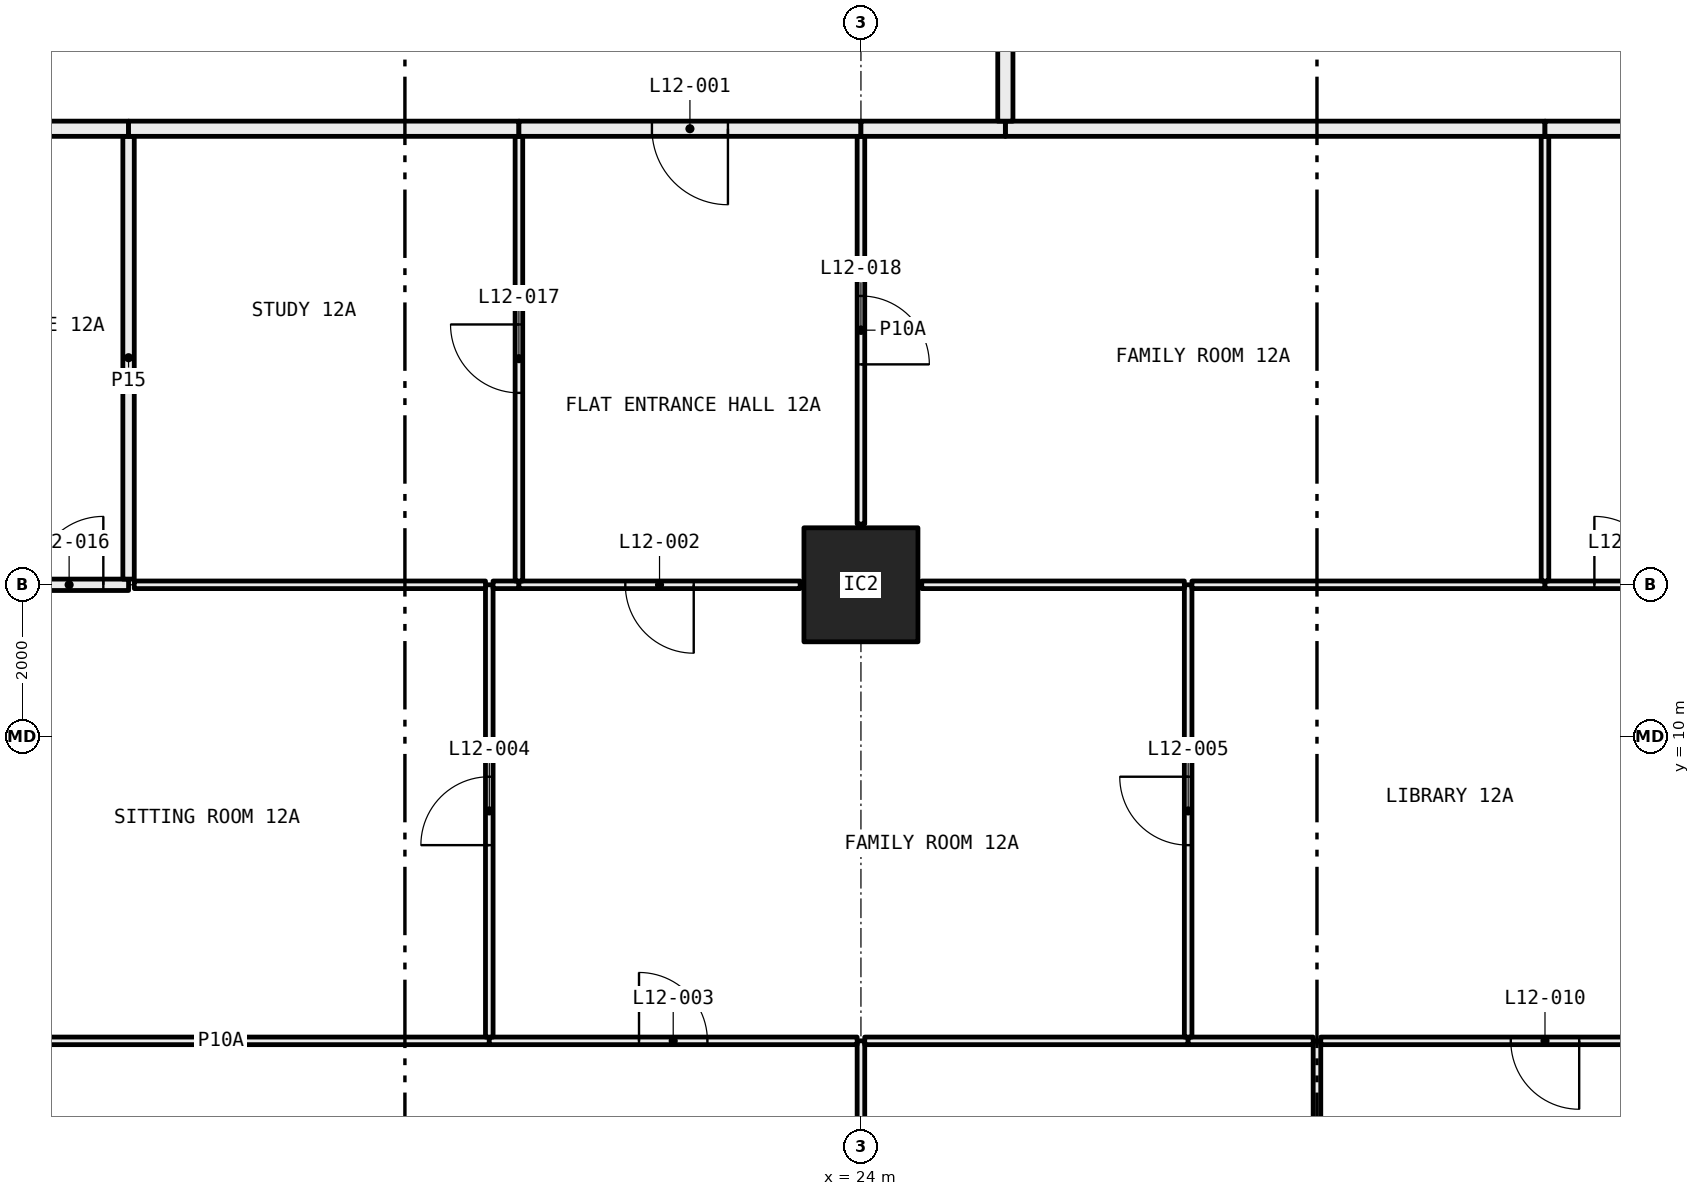
"""IFC4 building model, lengths in metres.
Left out: names, types, materials, properties, quantities, classifications, styles, units other than length and angle.
Written with IfcOpenShell. Run it as: python <this file> out.ifc"""

import sys

from ifc_helpers import new_model, si_unit, direction, frame, frame_2d, origin, origin_2d, place, context, subcontext, project, spatial, rectangle, hollow_rectangle, extrude, element, fill, save


model = new_model("IFC4")
c1 = context("Model", 3, precision=1e-05, world=origin(), true_north=direction((0.0, 1.0)))
c2 = subcontext(c1, "Body", "Model", "MODEL_VIEW")
j1 = project(units=[si_unit("LENGTHUNIT", "METRE"), si_unit("PLANEANGLEUNIT", "RADIAN")], contexts=[c1])
p1 = place(None, origin())
s1 = spatial("IfcSite", under=j1, at=p1, CompositionType="ELEMENT")
p2 = place(p1, origin())
s2 = spatial("IfcBuilding", under=s1, at=p2, CompositionType="ELEMENT")
p3 = place(p2, frame((0.0, 0.0, 54.15)))
s3 = spatial("IfcBuildingStorey", under=s2, at=p3, CompositionType="ELEMENT", Elevation=54.15)
p4 = place(p3, frame((24.0, 12.0, 0.0), z_axis=(0.0, 0.0, 1.0), x_axis=(1.0, 0.0, 0.0)))
e1 = element("IfcColumn", 1, at=p4, inside=s3, PredefinedType="COLUMN", context=c2, shape_type="SweptSolid", body=[
    extrude(hollow_rectangle(XDim=1.5, YDim=1.5, WallThickness=0.065, at=origin_2d()), origin(), (0.0, 0.0, 1.0), 3.05),
])
p5 = place(p3, frame((24.0, 0.72, 0.0), z_axis=(0.0, 0.0, 1.0), x_axis=(0.0, 1.0, 0.0)))
e2 = element("IfcWall", 2, at=p5, inside=s3, PredefinedType="PARTITIONING", context=c2, shape_type="SweptSolid", body=[
    extrude(rectangle(XDim=5.28, YDim=0.1, at=frame_2d((2.64, 0.0))), origin(), (0.0, 0.0, 1.0), 2.45),
])
p6 = place(p5, frame((2.19, 0.0, 0.0)))
e3 = element("IfcOpeningElement", 3, at=p6, cuts=e2, PredefinedType="OPENING", context=c2, shape_type="SweptSolid", body=[
    extrude(rectangle(XDim=0.9, YDim=2.1, at=frame_2d((0.45, 1.05))), frame((0.0, 0.06, 0.0), z_axis=(0.0, -1.0, 0.0), x_axis=(1.0, 0.0, 0.0)), (0.0, 0.0, 1.0), 0.12),
])
p7 = place(p3, frame((19.11, 6.0, 0.0), z_axis=(0.0, 0.0, 1.0), x_axis=(-1.0, 0.0, 0.0)))
e4 = element("IfcWall", 4, at=p7, inside=s3, PredefinedType="PARTITIONING", context=c2, shape_type="SweptSolid", body=[
    extrude(rectangle(XDim=7.06, YDim=0.1, at=frame_2d((3.53, 0.0))), origin(), (0.0, 0.0, 1.0), 2.45),
])
p8 = place(p3, frame((23.95, 6.0, 0.0), z_axis=(0.0, 0.0, 1.0), x_axis=(-1.0, 0.0, 0.0)))
e5 = element("IfcWall", 5, at=p8, inside=s3, PredefinedType="PARTITIONING", context=c2, shape_type="SweptSolid", body=[
    extrude(rectangle(XDim=4.84, YDim=0.1, at=frame_2d((2.42, 0.0))), origin(), (0.0, 0.0, 1.0), 2.45),
])
p9 = place(p8, frame((1.97, 0.0, 0.0)))
e6 = element("IfcOpeningElement", 6, at=p9, cuts=e5, PredefinedType="OPENING", context=c2, shape_type="SweptSolid", body=[
    extrude(rectangle(XDim=0.9, YDim=2.1, at=frame_2d((0.45, 1.05))), frame((0.0, 0.06, 0.0), z_axis=(0.0, -1.0, 0.0), x_axis=(1.0, 0.0, 0.0)), (0.0, 0.0, 1.0), 0.12),
])
p10 = place(p3, frame((30.0, 0.72, 0.0), z_axis=(0.0, 0.0, 1.0), x_axis=(0.0, 1.0, 0.0)))
e7 = element("IfcWall", 7, at=p10, inside=s3, PredefinedType="PARTITIONING", context=c2, shape_type="SweptSolid", body=[
    extrude(rectangle(XDim=5.28, YDim=0.1, at=frame_2d((2.64, 0.0))), origin(), (0.0, 0.0, 1.0), 3.05),
])
p11 = place(p3, frame((28.305, 6.0, 0.0), z_axis=(0.0, 0.0, 1.0), x_axis=(-1.0, 0.0, 0.0)))
e8 = element("IfcWall", 8, at=p11, inside=s3, PredefinedType="PARTITIONING", context=c2, shape_type="SweptSolid", body=[
    extrude(rectangle(XDim=4.255, YDim=0.1, at=frame_2d((2.127, 0.0))), origin(), (0.0, 0.0, 1.0), 2.45),
])
p12 = place(p3, frame((29.95, 6.0, 0.0), z_axis=(0.0, 0.0, 1.0), x_axis=(-1.0, 0.0, 0.0)))
e9 = element("IfcWall", 9, at=p12, inside=s3, PredefinedType="PARTITIONING", context=c2, shape_type="SweptSolid", body=[
    extrude(rectangle(XDim=1.645, YDim=0.1, at=frame_2d((0.823, 0.0))), origin(), (0.0, 0.0, 1.0), 3.05),
])
p13 = place(p3, frame((35.95, 6.0, 0.0), z_axis=(0.0, 0.0, 1.0), x_axis=(-1.0, 0.0, 0.0)))
e10 = element("IfcWall", 10, at=p13, inside=s3, PredefinedType="PARTITIONING", context=c2, shape_type="SweptSolid", body=[
    extrude(rectangle(XDim=5.9, YDim=0.1, at=frame_2d((2.95, 0.0))), origin(), (0.0, 0.0, 1.0), 2.45),
])
p14 = place(p13, frame((2.5, 0.0, 0.0)))
e11 = element("IfcOpeningElement", 11, at=p14, cuts=e10, PredefinedType="OPENING", context=c2, shape_type="SweptSolid", body=[
    extrude(rectangle(XDim=0.9, YDim=2.1, at=frame_2d((0.45, 1.05))), frame((0.0, 0.06, 0.0), z_axis=(0.0, -1.0, 0.0), x_axis=(1.0, 0.0, 0.0)), (0.0, 0.0, 1.0), 0.12),
])
p15 = place(p3, frame((19.11, 6.05, 0.0), z_axis=(0.0, 0.0, 1.0), x_axis=(0.0, 1.0, 0.0)))
e12 = element("IfcWall", 12, at=p15, inside=s3, PredefinedType="PARTITIONING", context=c2, shape_type="SweptSolid", body=[
    extrude(rectangle(XDim=5.95, YDim=0.1, at=frame_2d((2.975, 0.0))), origin(), (0.0, 0.0, 1.0), 2.45),
])
p16 = place(p15, frame((2.525, 0.0, 0.0)))
e13 = element("IfcOpeningElement", 13, at=p16, cuts=e12, PredefinedType="OPENING", context=c2, shape_type="SweptSolid", body=[
    extrude(rectangle(XDim=0.9, YDim=2.1, at=frame_2d((0.45, 1.05))), frame((0.0, 0.06, 0.0), z_axis=(0.0, -1.0, 0.0), x_axis=(1.0, 0.0, 0.0)), (0.0, 0.0, 1.0), 0.12),
])
p17 = place(p3, frame((14.364, 12.0, 0.0), z_axis=(0.0, 0.0, 1.0), x_axis=(-1.0, 0.0, 0.0)))
e14 = element("IfcWall", 14, at=p17, inside=s3, PredefinedType="PARTITIONING", context=c2, shape_type="SweptSolid", body=[
    extrude(rectangle(XDim=1.564, YDim=0.15, at=frame_2d((0.782, 0.0))), origin(), (0.0, 0.0, 1.0), 2.45),
])
p18 = place(p17, frame((0.332, 0.0, 0.0)))
e15 = element("IfcOpeningElement", 15, at=p18, cuts=e14, PredefinedType="OPENING", context=c2, shape_type="SweptSolid", body=[
    extrude(rectangle(XDim=0.9, YDim=2.1, at=frame_2d((0.45, 1.05))), frame((0.0, 0.085, 0.0), z_axis=(0.0, -1.0, 0.0), x_axis=(1.0, 0.0, 0.0)), (0.0, 0.0, 1.0), 0.17),
])
p19 = place(p3, frame((19.06, 12.0, 0.0), z_axis=(0.0, 0.0, 1.0), x_axis=(-1.0, 0.0, 0.0)))
e16 = element("IfcWall", 16, at=p19, inside=s3, PredefinedType="PARTITIONING", context=c2, shape_type="SweptSolid", body=[
    extrude(rectangle(XDim=4.621, YDim=0.1, at=frame_2d((2.311, 0.0))), origin(), (0.0, 0.0, 1.0), 2.45),
])
p20 = place(p3, frame((28.305, 6.05, 0.0), z_axis=(0.0, 0.0, 1.0), x_axis=(0.0, 1.0, 0.0)))
e17 = element("IfcWall", 17, at=p20, inside=s3, PredefinedType="PARTITIONING", context=c2, shape_type="SweptSolid", body=[
    extrude(rectangle(XDim=5.95, YDim=0.1, at=frame_2d((2.975, 0.0))), origin(), (0.0, 0.0, 1.0), 2.45),
])
p21 = place(p20, frame((2.525, 0.0, 0.0)))
e18 = element("IfcOpeningElement", 18, at=p21, cuts=e17, PredefinedType="OPENING", context=c2, shape_type="SweptSolid", body=[
    extrude(rectangle(XDim=0.9, YDim=2.1, at=frame_2d((0.45, 1.05))), frame((0.0, 0.06, 0.0), z_axis=(0.0, -1.0, 0.0), x_axis=(1.0, 0.0, 0.0)), (0.0, 0.0, 1.0), 0.12),
])
p22 = place(p3, frame((19.5, 12.0, 0.0), z_axis=(0.0, 0.0, 1.0), x_axis=(-1.0, 0.0, 0.0)))
e19 = element("IfcWall", 19, at=p22, inside=s3, PredefinedType="PARTITIONING", context=c2, shape_type="SweptSolid", body=[
    extrude(rectangle(XDim=0.34, YDim=0.1, at=frame_2d((0.17, 0.0))), origin(), (0.0, 0.0, 1.0), 2.45),
])
p23 = place(p3, frame((23.2, 12.0, 0.0), z_axis=(0.0, 0.0, 1.0), x_axis=(-1.0, 0.0, 0.0)))
e20 = element("IfcWall", 20, at=p23, inside=s3, PredefinedType="PARTITIONING", context=c2, shape_type="SweptSolid", body=[
    extrude(rectangle(XDim=3.7, YDim=0.1, at=frame_2d((1.85, 0.0))), origin(), (0.0, 0.0, 1.0), 2.45),
])
p24 = place(p23, frame((1.4, 0.0, 0.0)))
e21 = element("IfcOpeningElement", 21, at=p24, cuts=e20, PredefinedType="OPENING", context=c2, shape_type="SweptSolid", body=[
    extrude(rectangle(XDim=0.9, YDim=2.1, at=frame_2d((0.45, 1.05))), frame((0.0, 0.06, 0.0), z_axis=(0.0, -1.0, 0.0), x_axis=(1.0, 0.0, 0.0)), (0.0, 0.0, 1.0), 0.12),
])
p25 = place(p3, frame((28.255, 12.0, 0.0), z_axis=(0.0, 0.0, 1.0), x_axis=(-1.0, 0.0, 0.0)))
e22 = element("IfcWall", 22, at=p25, inside=s3, PredefinedType="PARTITIONING", context=c2, shape_type="SweptSolid", body=[
    extrude(rectangle(XDim=3.455, YDim=0.1, at=frame_2d((1.728, 0.0))), origin(), (0.0, 0.0, 1.0), 2.45),
])
p26 = place(p3, frame((33.0, 12.0, 0.0), z_axis=(0.0, 0.0, 1.0), x_axis=(-1.0, 0.0, 0.0)))
e23 = element("IfcWall", 23, at=p26, inside=s3, PredefinedType="PARTITIONING", context=c2, shape_type="SweptSolid", body=[
    extrude(rectangle(XDim=4.645, YDim=0.1, at=frame_2d((2.323, 0.0))), origin(), (0.0, 0.0, 1.0), 2.45),
])
p27 = place(p3, frame((35.2, 12.0, 0.0), z_axis=(0.0, 0.0, 1.0), x_axis=(-1.0, 0.0, 0.0)))
e24 = element("IfcWall", 24, at=p27, inside=s3, PredefinedType="PARTITIONING", context=c2, shape_type="SweptSolid", body=[
    extrude(rectangle(XDim=2.2, YDim=0.1, at=frame_2d((1.1, 0.0))), origin(), (0.0, 0.0, 1.0), 2.45),
])
p28 = place(p27, frame((0.65, 0.0, 0.0)))
e25 = element("IfcOpeningElement", 25, at=p28, cuts=e24, PredefinedType="OPENING", context=c2, shape_type="SweptSolid", body=[
    extrude(rectangle(XDim=0.9, YDim=2.1, at=frame_2d((0.45, 1.05))), frame((0.0, 0.06, 0.0), z_axis=(0.0, -1.0, 0.0), x_axis=(1.0, 0.0, 0.0)), (0.0, 0.0, 1.0), 0.12),
])
p29 = place(p3, frame((14.364, 12.075, 0.0), z_axis=(0.0, 0.0, 1.0), x_axis=(0.0, 1.0, 0.0)))
e26 = element("IfcWall", 26, at=p29, inside=s3, PredefinedType="PARTITIONING", context=c2, shape_type="SweptSolid", body=[
    extrude(rectangle(XDim=5.825, YDim=0.15, at=frame_2d((2.913, 0.0))), origin(), (0.0, 0.0, 1.0), 2.45),
])
p30 = place(p3, frame((14.364, 18.0, 0.0), z_axis=(0.0, 0.0, 1.0), x_axis=(-1.0, 0.0, 0.0)))
e27 = element("IfcWall", 27, at=p30, inside=s3, PredefinedType="PARTITIONING", context=c2, shape_type="SweptSolid", body=[
    extrude(rectangle(XDim=2.0, YDim=0.2, at=frame_2d((1.0, 0.0))), origin(), (0.0, 0.0, 1.0), 3.05),
])
p31 = place(p3, frame((19.5, 12.05, 0.0), z_axis=(0.0, 0.0, 1.0), x_axis=(0.0, 1.0, 0.0)))
e28 = element("IfcWall", 28, at=p31, inside=s3, PredefinedType="PARTITIONING", context=c2, shape_type="SweptSolid", body=[
    extrude(rectangle(XDim=5.85, YDim=0.1, at=frame_2d((2.925, 0.0))), origin(), (0.0, 0.0, 1.0), 2.45),
])
p32 = place(p31, frame((2.475, 0.0, 0.0)))
e29 = element("IfcOpeningElement", 29, at=p32, cuts=e28, PredefinedType="OPENING", context=c2, shape_type="SweptSolid", body=[
    extrude(rectangle(XDim=0.9, YDim=2.1, at=frame_2d((0.45, 1.05))), frame((0.0, 0.06, 0.0), z_axis=(0.0, -1.0, 0.0), x_axis=(1.0, 0.0, 0.0)), (0.0, 0.0, 1.0), 0.12),
])
p33 = place(p3, frame((19.5, 18.0, 0.0), z_axis=(0.0, 0.0, 1.0), x_axis=(-1.0, 0.0, 0.0)))
e30 = element("IfcWall", 30, at=p33, inside=s3, PredefinedType="PARTITIONING", context=c2, shape_type="SweptSolid", body=[
    extrude(rectangle(XDim=5.136, YDim=0.2, at=frame_2d((2.568, 0.0))), origin(), (0.0, 0.0, 1.0), 3.05),
])
p34 = place(p3, frame((24.0, 12.8, 0.0), z_axis=(0.0, 0.0, 1.0), x_axis=(0.0, 1.0, 0.0)))
e31 = element("IfcWall", 31, at=p34, inside=s3, PredefinedType="PARTITIONING", context=c2, shape_type="SweptSolid", body=[
    extrude(rectangle(XDim=5.1, YDim=0.1, at=frame_2d((2.55, 0.0))), origin(), (0.0, 0.0, 1.0), 3.05),
])
p35 = place(p34, frame((2.1, 0.0, 0.0)))
e32 = element("IfcOpeningElement", 32, at=p35, cuts=e31, PredefinedType="OPENING", context=c2, shape_type="SweptSolid", body=[
    extrude(rectangle(XDim=0.9, YDim=2.1, at=frame_2d((0.45, 1.05))), frame((0.0, 0.06, 0.0), z_axis=(0.0, -1.0, 0.0), x_axis=(1.0, 0.0, 0.0)), (0.0, 0.0, 1.0), 0.12),
])
p36 = place(p3, frame((24.0, 18.0, 0.0), z_axis=(0.0, 0.0, 1.0), x_axis=(-1.0, 0.0, 0.0)))
e33 = element("IfcWall", 33, at=p36, inside=s3, PredefinedType="PARTITIONING", context=c2, shape_type="SweptSolid", body=[
    extrude(rectangle(XDim=4.5, YDim=0.2, at=frame_2d((2.25, 0.0))), origin(), (0.0, 0.0, 1.0), 3.05),
])
p37 = place(p36, frame((1.75, 0.0, 0.0)))
e34 = element("IfcOpeningElement", 34, at=p37, cuts=e33, PredefinedType="OPENING", context=c2, shape_type="SweptSolid", body=[
    extrude(rectangle(XDim=1.0, YDim=2.1, at=frame_2d((0.5, 1.05))), frame((0.0, 0.11, 0.0), z_axis=(0.0, -1.0, 0.0), x_axis=(1.0, 0.0, 0.0)), (0.0, 0.0, 1.0), 0.22),
])
p38 = place(p3, frame((33.0, 12.05, 0.0), z_axis=(0.0, 0.0, 1.0), x_axis=(0.0, 1.0, 0.0)))
e35 = element("IfcWall", 35, at=p38, inside=s3, PredefinedType="PARTITIONING", context=c2, shape_type="SweptSolid", body=[
    extrude(rectangle(XDim=5.85, YDim=0.1, at=frame_2d((2.925, 0.0))), origin(), (0.0, 0.0, 1.0), 2.45),
])
p39 = place(p3, frame((33.0, 18.0, 0.0), z_axis=(0.0, 0.0, 1.0), x_axis=(-1.0, 0.0, 0.0)))
e36 = element("IfcWall", 36, at=p39, inside=s3, PredefinedType="PARTITIONING", context=c2, shape_type="SweptSolid", body=[
    extrude(rectangle(XDim=7.1, YDim=0.2, at=frame_2d((3.55, 0.0))), origin(), (0.0, 0.0, 1.0), 3.05),
])
p40 = place(p3, frame((25.9, 18.0, 0.0), z_axis=(0.0, 0.0, 1.0), x_axis=(-1.0, 0.0, 0.0)))
e37 = element("IfcWall", 37, at=p40, inside=s3, PredefinedType="PARTITIONING", context=c2, shape_type="SweptSolid", body=[
    extrude(rectangle(XDim=1.9, YDim=0.2, at=frame_2d((0.95, 0.0))), origin(), (0.0, 0.0, 1.0), 3.05),
])
p41 = place(p3, frame((36.0, 18.0, 0.0), z_axis=(0.0, 0.0, 1.0), x_axis=(-1.0, 0.0, 0.0)))
e38 = element("IfcWall", 38, at=p41, inside=s3, PredefinedType="PARTITIONING", context=c2, shape_type="SweptSolid", body=[
    extrude(rectangle(XDim=3.0, YDim=0.2, at=frame_2d((1.5, 0.0))), origin(), (0.0, 0.0, 1.0), 2.45),
])
p42 = place(p3, frame((25.9, 23.9, 0.0), z_axis=(0.0, 0.0, 1.0), x_axis=(0.0, -1.0, 0.0)))
e39 = element("IfcWall", 39, at=p42, inside=s3, PredefinedType="PARTITIONING", context=c2, shape_type="SweptSolid", body=[
    extrude(rectangle(XDim=5.8, YDim=0.2, at=frame_2d((2.9, 0.0))), origin(), (0.0, 0.0, 1.0), 3.05),
])
p43 = place(p37, origin())
e40 = element("IfcDoor", 40, at=p43, inside=s3, OperationType="SINGLE_SWING_RIGHT", PredefinedType="DOOR", context=c2, shape_type="SweptSolid", body=[
    extrude(rectangle(XDim=1.0, YDim=2.1, at=frame_2d((0.5, 1.05))), frame((0.0, 0.025, 0.0), z_axis=(0.0, -1.0, 0.0), x_axis=(1.0, 0.0, 0.0)), (0.0, 0.0, 1.0), 0.05),
])
fill(e34, e40)
p44 = place(p24, origin())
e41 = element("IfcDoor", 41, at=p44, inside=s3, OperationType="SINGLE_SWING_RIGHT", PredefinedType="DOOR", context=c2, shape_type="SweptSolid", body=[
    extrude(rectangle(XDim=0.9, YDim=2.1, at=frame_2d((0.45, 1.05))), frame((0.0, 0.025, 0.0), z_axis=(0.0, -1.0, 0.0), x_axis=(1.0, 0.0, 0.0)), (0.0, 0.0, 1.0), 0.05),
])
fill(e21, e41)
p45 = place(p9, frame((0.9, 0.0, 0.0), x_axis=(-1.0, 0.0, 0.0)))
e42 = element("IfcDoor", 42, at=p45, inside=s3, OperationType="SINGLE_SWING_RIGHT", PredefinedType="DOOR", context=c2, shape_type="SweptSolid", body=[
    extrude(rectangle(XDim=0.9, YDim=2.1, at=frame_2d((0.45, 1.05))), frame((0.0, 0.025, 0.0), z_axis=(0.0, -1.0, 0.0), x_axis=(1.0, 0.0, 0.0)), (0.0, 0.0, 1.0), 0.05),
])
fill(e6, e42)
p46 = place(p16, origin())
e43 = element("IfcDoor", 43, at=p46, inside=s3, OperationType="SINGLE_SWING_RIGHT", PredefinedType="DOOR", context=c2, shape_type="SweptSolid", body=[
    extrude(rectangle(XDim=0.9, YDim=2.1, at=frame_2d((0.45, 1.05))), frame((0.0, 0.025, 0.0), z_axis=(0.0, -1.0, 0.0), x_axis=(1.0, 0.0, 0.0)), (0.0, 0.0, 1.0), 0.05),
])
fill(e13, e43)
p47 = place(p21, origin())
e44 = element("IfcDoor", 44, at=p47, inside=s3, OperationType="SINGLE_SWING_LEFT", PredefinedType="DOOR", context=c2, shape_type="SweptSolid", body=[
    extrude(rectangle(XDim=0.9, YDim=2.1, at=frame_2d((0.45, 1.05))), frame((0.0, 0.025, 0.0), z_axis=(0.0, -1.0, 0.0), x_axis=(1.0, 0.0, 0.0)), (0.0, 0.0, 1.0), 0.05),
])
fill(e18, e44)
p48 = place(p14, origin())
e45 = element("IfcDoor", 45, at=p48, inside=s3, OperationType="SINGLE_SWING_RIGHT", PredefinedType="DOOR", context=c2, shape_type="SweptSolid", body=[
    extrude(rectangle(XDim=0.9, YDim=2.1, at=frame_2d((0.45, 1.05))), frame((0.0, 0.025, 0.0), z_axis=(0.0, -1.0, 0.0), x_axis=(1.0, 0.0, 0.0)), (0.0, 0.0, 1.0), 0.05),
])
fill(e11, e45)
p49 = place(p18, frame((0.9, 0.0, 0.0), x_axis=(-1.0, 0.0, 0.0)))
e46 = element("IfcDoor", 46, at=p49, inside=s3, OperationType="SINGLE_SWING_LEFT", PredefinedType="DOOR", context=c2, shape_type="SweptSolid", body=[
    extrude(rectangle(XDim=0.9, YDim=2.1, at=frame_2d((0.45, 1.05))), frame((0.0, 0.025, 0.0), z_axis=(0.0, -1.0, 0.0), x_axis=(1.0, 0.0, 0.0)), (0.0, 0.0, 1.0), 0.05),
])
fill(e15, e46)
p50 = place(p32, origin())
e47 = element("IfcDoor", 47, at=p50, inside=s3, OperationType="SINGLE_SWING_LEFT", PredefinedType="DOOR", context=c2, shape_type="SweptSolid", body=[
    extrude(rectangle(XDim=0.9, YDim=2.1, at=frame_2d((0.45, 1.05))), frame((0.0, 0.025, 0.0), z_axis=(0.0, -1.0, 0.0), x_axis=(1.0, 0.0, 0.0)), (0.0, 0.0, 1.0), 0.05),
])
fill(e29, e47)
p51 = place(p35, frame((0.9, 0.0, 0.0), x_axis=(-1.0, 0.0, 0.0)))
e48 = element("IfcDoor", 48, at=p51, inside=s3, OperationType="SINGLE_SWING_LEFT", PredefinedType="DOOR", context=c2, shape_type="SweptSolid", body=[
    extrude(rectangle(XDim=0.9, YDim=2.1, at=frame_2d((0.45, 1.05))), frame((0.0, 0.025, 0.0), z_axis=(0.0, -1.0, 0.0), x_axis=(1.0, 0.0, 0.0)), (0.0, 0.0, 1.0), 0.05),
])
fill(e32, e48)
p52 = place(p28, frame((0.9, 0.0, 0.0), x_axis=(-1.0, 0.0, 0.0)))
e49 = element("IfcDoor", 49, at=p52, inside=s3, OperationType="SINGLE_SWING_RIGHT", PredefinedType="DOOR", context=c2, shape_type="SweptSolid", body=[
    extrude(rectangle(XDim=0.9, YDim=2.1, at=frame_2d((0.45, 1.05))), frame((0.0, 0.025, 0.0), z_axis=(0.0, -1.0, 0.0), x_axis=(1.0, 0.0, 0.0)), (0.0, 0.0, 1.0), 0.05),
])
fill(e25, e49)
save(model, sys.argv[1])
